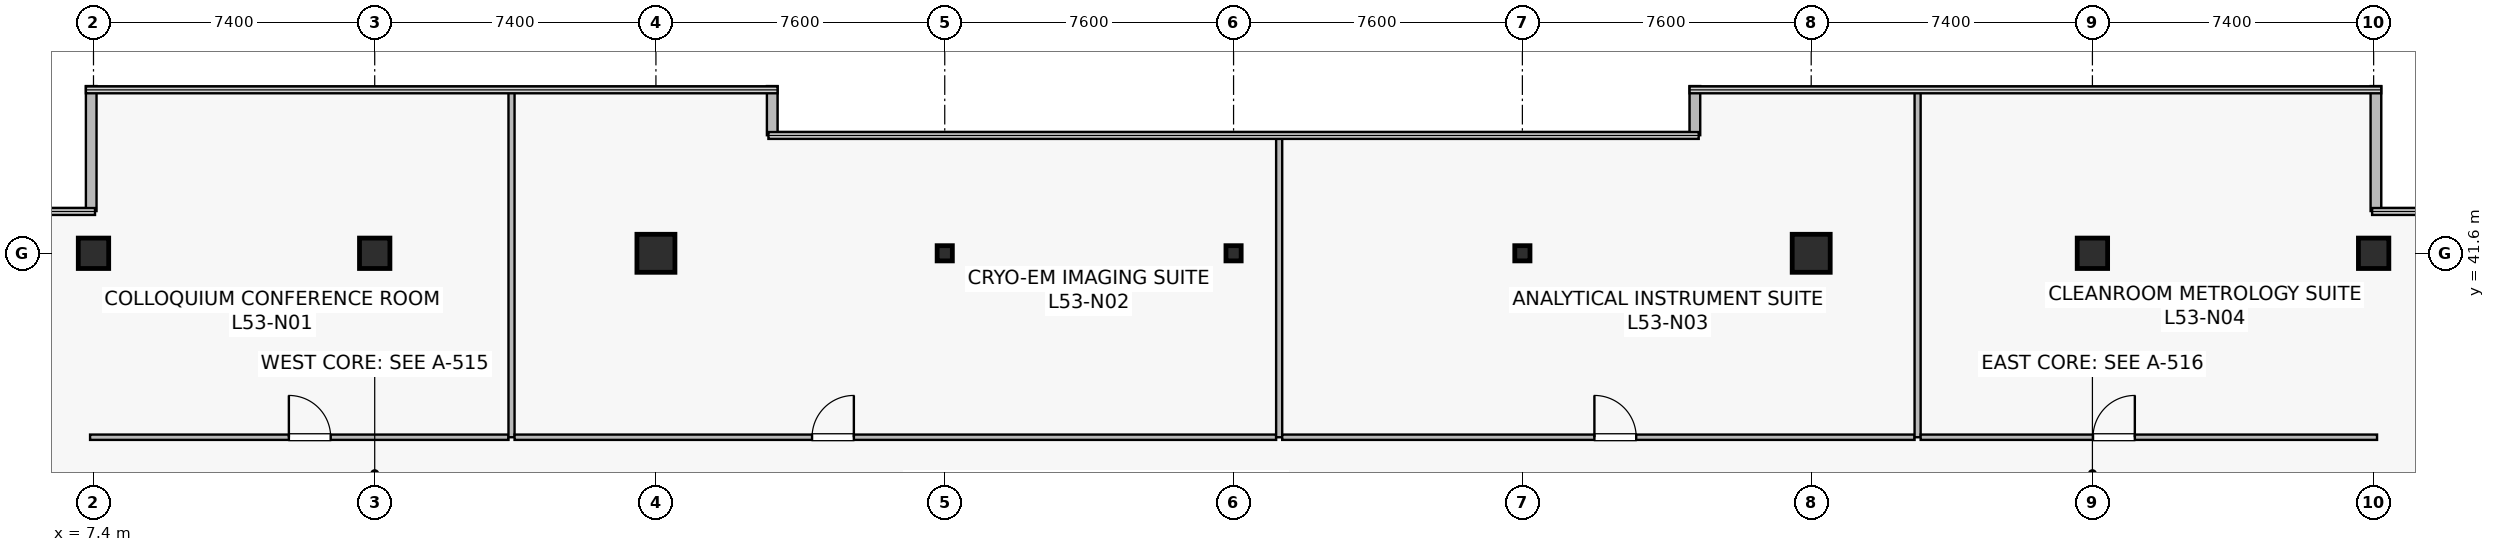
"""IFC4 building model, lengths in metres.
Left out: names, types, materials, properties, quantities, classifications, styles, units other than length and angle.
Written with IfcOpenShell. Run it as: python <this file> out.ifc"""

import sys

from ifc_helpers import new_model, si_unit, direction, frame, frame_2d, origin, origin_2d, place, context, subcontext, project, spatial, rectangle, hollow_rectangle, extrude, source, transform, mapped, element, fill, save


model = new_model("IFC4")
c1 = context("Model", 3, precision=1e-05, world=origin(), true_north=direction((0.0, 1.0)))
c2 = subcontext(c1, "Body", "Model", "MODEL_VIEW")
j1 = project(units=[si_unit("LENGTHUNIT", "METRE"), si_unit("PLANEANGLEUNIT", "RADIAN")], contexts=[c1])
p1 = place(None, origin())
s1 = spatial("IfcSite", under=j1, at=p1, CompositionType="ELEMENT")
p2 = place(p1, origin())
s2 = spatial("IfcBuilding", under=s1, at=p2, CompositionType="ELEMENT")
p3 = place(p2, frame((0.0, 0.0, 221.9)))
s3 = spatial("IfcBuildingStorey", under=s2, at=p3, CompositionType="ELEMENT", Elevation=221.9)
m1 = source(origin(), c2, "Body", "SweptSolid", [
    extrude(rectangle(XDim=0.8, YDim=0.8, at=origin_2d()), origin(), (0.0, 0.0, 1.0), 4.1),
])
p4 = place(p3, frame((14.8, 41.6, 0.0), z_axis=(0.0, 0.0, 1.0), x_axis=(1.0, 0.0, 0.0)))
e1 = element("IfcColumn", 1, at=p4, inside=s3, PredefinedType="COLUMN", context=c2, shape_type="MappedRepresentation", body=[
    mapped(m1, transform((0.0, 0.0, 0.0), scale=1.0)),
])
m2 = source(origin(), c2, "Body", "SweptSolid", [
    extrude(rectangle(XDim=1.0, YDim=1.0, at=origin_2d()), origin(), (0.0, 0.0, 1.0), 4.1),
])
for number, where, z_axis, x_axis in (
    (2, (22.2, 41.6, 0.0), (0.0, 0.0, 1.0), (1.0, 0.0, 0.0)),
    (3, (52.6, 41.6, 0.0), (0.0, 0.0, 1.0), (1.0, 0.0, 0.0)),
):
    element("IfcColumn", number, at=place(p3, frame(where, z_axis=z_axis, x_axis=x_axis)), inside=s3, PredefinedType="COLUMN", context=c2, shape_type="MappedRepresentation", body=[
        mapped(m2, transform((0.0, 0.0, 0.0), scale=1.0)),
    ])
for number, where, z_axis, x_axis in (
    (4, (60.0, 41.6, 0.0), (0.0, 0.0, 1.0), (1.0, 0.0, 0.0)),
    (5, (7.4, 41.6, 0.0), (0.0, 0.0, 1.0), (1.0, 0.0, 0.0)),
    (6, (67.4, 41.6, 0.0), (0.0, 0.0, 1.0), (1.0, 0.0, 0.0)),
):
    element("IfcColumn", number, at=place(p3, frame(where, z_axis=z_axis, x_axis=x_axis)), inside=s3, PredefinedType="COLUMN", context=c2, shape_type="MappedRepresentation", body=[
        mapped(m1, transform((0.0, 0.0, 0.0), scale=1.0)),
    ])
m3 = source(origin(), c2, "Body", "SweptSolid", [
    extrude(hollow_rectangle(XDim=0.4, YDim=0.4, WallThickness=0.019, at=origin_2d()), origin(), (0.0, 0.0, 1.0), 4.1),
])
for number, where, z_axis, x_axis in (
    (7, (29.8, 41.6, 0.0), (0.0, 0.0, 1.0), (1.0, 0.0, 0.0)),
    (8, (37.4, 41.6, 0.0), (0.0, 0.0, 1.0), (1.0, 0.0, 0.0)),
    (9, (45.0, 41.6, 0.0), (0.0, 0.0, 1.0), (1.0, 0.0, 0.0)),
):
    element("IfcColumn", number, at=place(p3, frame(where, z_axis=z_axis, x_axis=x_axis)), inside=s3, PredefinedType="COLUMN", context=c2, shape_type="MappedRepresentation", body=[
        mapped(m3, transform((0.0, 0.0, 0.0), scale=1.0)),
    ])
p5 = place(p3, frame((67.46, 42.712, 0.0), z_axis=(0.0, 0.0, 1.0), x_axis=(0.0, 1.0, 0.0)))
e10 = element("IfcWall", 10, at=p5, inside=s3, PredefinedType="STANDARD", context=c2, shape_type="SweptSolid", body=[
    extrude(rectangle(XDim=3.288, YDim=0.28, at=frame_2d((1.644, 0.0))), origin(), (0.0, 0.0, 1.0), 3.8),
])
for number, where, z_axis, x_axis in (
    (11, (49.54, 46.0, 0.0), (0.0, 0.0, 1.0), (0.0, -1.0, 0.0)),
    (12, (25.26, 44.707, 0.0), (0.0, 0.0, 1.0), (0.0, 1.0, 0.0)),
):
    element("IfcWall", number, at=place(p3, frame(where, z_axis=z_axis, x_axis=x_axis)), inside=s3, PredefinedType="STANDARD", context=c2, shape_type="SweptSolid", body=[
        extrude(rectangle(XDim=1.293, YDim=0.28, at=frame_2d((0.646, 0.0))), origin(), (0.0, 0.0, 1.0), 3.8),
    ])
p6 = place(p3, frame((7.34, 46.0, 0.0), z_axis=(0.0, 0.0, 1.0), x_axis=(0.0, -1.0, 0.0)))
e13 = element("IfcWall", 13, at=p6, inside=s3, PredefinedType="STANDARD", context=c2, shape_type="SweptSolid", body=[
    extrude(rectangle(XDim=3.288, YDim=0.28, at=frame_2d((1.644, 0.0))), origin(), (0.0, 0.0, 1.0), 3.8),
])
p7 = place(p3, frame((7.31, 36.76, 0.0), z_axis=(0.0, 0.0, 1.0), x_axis=(1.0, 0.0, 0.0)))
e14 = element("IfcWall", 14, at=p7, inside=s3, PredefinedType="PARTITIONING", context=c2, shape_type="SweptSolid", body=[
    extrude(rectangle(XDim=11.01, YDim=0.14, at=frame_2d((5.505, 0.0))), origin(), (0.0, 0.0, 1.0), 3.197),
])
p8 = place(p7, frame((5.231, 0.0, 0.0)))
e15 = element("IfcOpeningElement", 15, at=p8, cuts=e14, PredefinedType="OPENING", context=c2, shape_type="SweptSolid", body=[
    extrude(rectangle(XDim=1.1, YDim=2.18, at=frame_2d((0.55, 1.09))), frame((0.0, 0.08, 0.0), z_axis=(0.0, -1.0, 0.0), x_axis=(1.0, 0.0, 0.0)), (0.0, 0.0, 1.0), 0.16),
])
p9 = place(p3, frame((18.4, 36.76, 0.0), z_axis=(0.0, 0.0, 1.0), x_axis=(0.0, 1.0, 0.0)))
e16 = element("IfcWall", 16, at=p9, inside=s3, PredefinedType="PARTITIONING", context=c2, shape_type="SweptSolid", body=[
    extrude(rectangle(XDim=9.13, YDim=0.16, at=frame_2d((4.565, 0.0))), origin(), (0.0, 0.0, 1.0), 3.135),
])
p10 = place(p3, frame((18.48, 36.76, 0.0), z_axis=(0.0, 0.0, 1.0), x_axis=(1.0, 0.0, 0.0)))
e17 = element("IfcWall", 17, at=p10, inside=s3, PredefinedType="PARTITIONING", context=c2, shape_type="SweptSolid", body=[
    extrude(rectangle(XDim=20.04, YDim=0.14, at=frame_2d((10.02, 0.0))), origin(), (0.0, 0.0, 1.0), 3.197),
])
p11 = place(p10, frame((7.828, 0.0, 0.0)))
e18 = element("IfcOpeningElement", 18, at=p11, cuts=e17, PredefinedType="OPENING", context=c2, shape_type="SweptSolid", body=[
    extrude(rectangle(XDim=1.1, YDim=2.18, at=frame_2d((0.55, 1.09))), frame((0.0, 0.08, 0.0), z_axis=(0.0, -1.0, 0.0), x_axis=(1.0, 0.0, 0.0)), (0.0, 0.0, 1.0), 0.16),
])
p12 = place(p3, frame((38.6, 36.76, 0.0), z_axis=(0.0, 0.0, 1.0), x_axis=(0.0, 1.0, 0.0)))
e19 = element("IfcWall", 19, at=p12, inside=s3, PredefinedType="PARTITIONING", context=c2, shape_type="SweptSolid", body=[
    extrude(rectangle(XDim=7.93, YDim=0.16, at=frame_2d((3.965, 0.0))), origin(), (0.0, 0.0, 1.0), 3.135),
])
p13 = place(p3, frame((38.68, 36.76, 0.0), z_axis=(0.0, 0.0, 1.0), x_axis=(1.0, 0.0, 0.0)))
e20 = element("IfcWall", 20, at=p13, inside=s3, PredefinedType="PARTITIONING", context=c2, shape_type="SweptSolid", body=[
    extrude(rectangle(XDim=16.64, YDim=0.14, at=frame_2d((8.32, 0.0))), origin(), (0.0, 0.0, 1.0), 3.197),
])
p14 = place(p13, frame((8.215, 0.0, 0.0)))
e21 = element("IfcOpeningElement", 21, at=p14, cuts=e20, PredefinedType="OPENING", context=c2, shape_type="SweptSolid", body=[
    extrude(rectangle(XDim=1.1, YDim=2.18, at=frame_2d((0.55, 1.09))), frame((0.0, 0.08, 0.0), z_axis=(0.0, -1.0, 0.0), x_axis=(1.0, 0.0, 0.0)), (0.0, 0.0, 1.0), 0.16),
])
p15 = place(p3, frame((55.4, 36.76, 0.0), z_axis=(0.0, 0.0, 1.0), x_axis=(0.0, 1.0, 0.0)))
e22 = element("IfcWall", 22, at=p15, inside=s3, PredefinedType="PARTITIONING", context=c2, shape_type="SweptSolid", body=[
    extrude(rectangle(XDim=9.13, YDim=0.16, at=frame_2d((4.565, 0.0))), origin(), (0.0, 0.0, 1.0), 3.135),
])
p16 = place(p3, frame((55.48, 36.76, 0.0), z_axis=(0.0, 0.0, 1.0), x_axis=(1.0, 0.0, 0.0)))
e23 = element("IfcWall", 23, at=p16, inside=s3, PredefinedType="PARTITIONING", context=c2, shape_type="SweptSolid", body=[
    extrude(rectangle(XDim=12.01, YDim=0.14, at=frame_2d((6.005, 0.0))), origin(), (0.0, 0.0, 1.0), 3.197),
])
p17 = place(p16, frame((4.536, 0.0, 0.0)))
e24 = element("IfcOpeningElement", 24, at=p17, cuts=e23, PredefinedType="OPENING", context=c2, shape_type="SweptSolid", body=[
    extrude(rectangle(XDim=1.1, YDim=2.18, at=frame_2d((0.55, 1.09))), frame((0.0, 0.08, 0.0), z_axis=(0.0, -1.0, 0.0), x_axis=(1.0, 0.0, 0.0)), (0.0, 0.0, 1.0), 0.16),
])
m4 = source(origin(), c2, "Body", "SweptSolid", [
    extrude(rectangle(XDim=1.1, YDim=2.18, at=frame_2d((0.55, 1.09))), frame((0.0, 0.025, 0.0), z_axis=(0.0, -1.0, 0.0), x_axis=(1.0, 0.0, 0.0)), (0.0, 0.0, 1.0), 0.05),
])
p18 = place(p8, origin())
e25 = element("IfcDoor", 25, at=p18, inside=s3, OperationType="SINGLE_SWING_LEFT", PredefinedType="DOOR", context=c2, shape_type="MappedRepresentation", body=[
    mapped(m4, transform((0.0, 0.0, 0.0), scale=1.0)),
])
fill(e15, e25)
p19 = place(p11, origin())
e26 = element("IfcDoor", 26, at=p19, inside=s3, OperationType="SINGLE_SWING_RIGHT", PredefinedType="DOOR", context=c2, shape_type="MappedRepresentation", body=[
    mapped(m4, transform((0.0, 0.0, 0.0), scale=1.0)),
])
fill(e18, e26)
p20 = place(p14, origin())
e27 = element("IfcDoor", 27, at=p20, inside=s3, OperationType="SINGLE_SWING_LEFT", PredefinedType="DOOR", context=c2, shape_type="MappedRepresentation", body=[
    mapped(m4, transform((0.0, 0.0, 0.0), scale=1.0)),
])
fill(e21, e27)
p21 = place(p17, origin())
e28 = element("IfcDoor", 28, at=p21, inside=s3, OperationType="SINGLE_SWING_RIGHT", PredefinedType="DOOR", context=c2, shape_type="MappedRepresentation", body=[
    mapped(m4, transform((0.0, 0.0, 0.0), scale=1.0)),
])
fill(e24, e28)
save(model, sys.argv[1])
